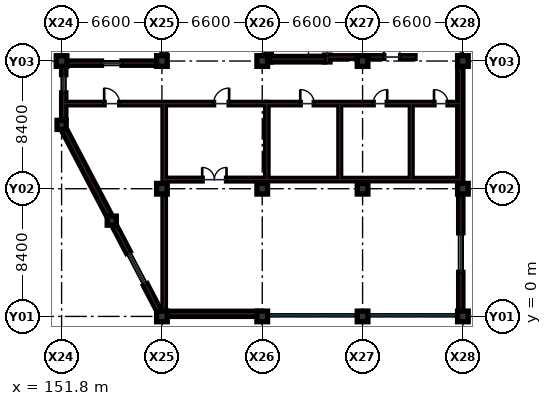
"""IFC4 building model, lengths in metres.
Left out: names, types, materials, properties, quantities, classifications, styles, units other than length and angle.
Written with IfcOpenShell. Run it as: python <this file> out.ifc"""

import sys

from ifc_helpers import new_model, si_unit, direction, frame, frame_2d, origin, origin_2d, place, context, subcontext, project, spatial, rectangle, extrude, element, fill, save


model = new_model("IFC4")
c1 = context("Model", 3, precision=1e-05, world=origin(), true_north=direction((0.0, 1.0)))
c2 = subcontext(c1, "Body", "Model", "MODEL_VIEW")
j1 = project(units=[si_unit("LENGTHUNIT", "METRE"), si_unit("PLANEANGLEUNIT", "RADIAN")], contexts=[c1])
p1 = place(None, origin())
s1 = spatial("IfcSite", under=j1, at=p1, CompositionType="ELEMENT")
p2 = place(p1, origin())
s2 = spatial("IfcBuilding", under=s1, at=p2, CompositionType="ELEMENT")
p3 = place(p2, frame((0.0, 0.0, 22.8)))
s3 = spatial("IfcBuildingStorey", under=s2, at=p3, CompositionType="ELEMENT", Elevation=22.8)
for number, where, z_axis, x_axis in (
    (1, (151.8, 16.8, 0.0), (0.0, 0.0, 1.0), (1.0, 0.0, 0.0)),
    (2, (158.4, 0.0, 0.0), (0.0, 0.0, 1.0), (1.0, 0.0, 0.0)),
    (3, (158.4, 8.4, 0.0), (0.0, 0.0, 1.0), (1.0, 0.0, 0.0)),
    (4, (158.4, 16.8, 0.0), (0.0, 0.0, 1.0), (1.0, 0.0, 0.0)),
    (5, (165.0, 0.0, 0.0), (0.0, 0.0, 1.0), (1.0, 0.0, 0.0)),
    (6, (165.0, 8.4, 0.0), (0.0, 0.0, 1.0), (1.0, 0.0, 0.0)),
    (7, (165.0, 16.8, 0.0), (0.0, 0.0, 1.0), (1.0, 0.0, 0.0)),
    (8, (171.6, 0.0, 0.0), (0.0, 0.0, 1.0), (1.0, 0.0, 0.0)),
    (9, (171.6, 8.4, 0.0), (0.0, 0.0, 1.0), (1.0, 0.0, 0.0)),
    (10, (171.6, 16.8, 0.0), (0.0, 0.0, 1.0), (1.0, 0.0, 0.0)),
    (11, (178.2, 0.0, 0.0), (0.0, 0.0, 1.0), (1.0, 0.0, 0.0)),
    (12, (178.2, 8.4, 0.0), (0.0, 0.0, 1.0), (1.0, 0.0, 0.0)),
    (13, (178.2, 16.8, 0.0), (0.0, 0.0, 1.0), (1.0, 0.0, 0.0)),
):
    element("IfcColumn", number, at=place(p3, frame(where, z_axis=z_axis, x_axis=x_axis)), inside=s3, PredefinedType="COLUMN", context=c2, shape_type="SweptSolid", body=[
        extrude(rectangle(XDim=0.7, YDim=0.7, at=origin_2d()), origin(), (0.0, 0.0, 1.0), 4.2),
    ])
for number, where, z_axis, x_axis in (
    (14, (151.8, 12.6, 0.0), (0.0, 0.0, 1.0), (1.0, 0.0, 0.0)),
    (15, (155.1, 6.3, 0.0), (0.0, 0.0, 1.0), (1.0, 0.0, 0.0)),
):
    element("IfcColumn", number, at=place(p3, frame(where, z_axis=z_axis, x_axis=x_axis)), inside=s3, PredefinedType="COLUMN", context=c2, shape_type="SweptSolid", body=[
        extrude(rectangle(XDim=0.6, YDim=0.6, at=origin_2d()), origin(), (0.0, 0.0, 1.0), 4.2),
    ])
p4 = place(p3, frame((165.3, 14.0, 0.0), z_axis=(0.0, 0.0, 1.0), x_axis=(1.0, 0.0, 0.0)))
e16 = element("IfcWall", 16, at=p4, inside=s3, PredefinedType="PARTITIONING", context=c2, shape_type="SweptSolid", body=[
    extrude(rectangle(XDim=12.7, YDim=0.16, at=frame_2d((6.35, 0.0))), origin(), (0.0, 0.0, 1.0), 3.23),
])
p5 = place(p4, frame((2.2, 0.0, 0.0)))
e17 = element("IfcOpeningElement", 17, at=p5, cuts=e16, PredefinedType="OPENING", context=c2, shape_type="SweptSolid", body=[
    extrude(rectangle(XDim=0.92, YDim=2.08, at=frame_2d((0.46, 1.04))), frame((0.0, 0.09, 0.0), z_axis=(0.0, -1.0, 0.0), x_axis=(1.0, 0.0, 0.0)), (0.0, 0.0, 1.0), 0.18),
])
p6 = place(p4, frame((7.0, 0.0, 0.0)))
e18 = element("IfcOpeningElement", 18, at=p6, cuts=e16, PredefinedType="OPENING", context=c2, shape_type="SweptSolid", body=[
    extrude(rectangle(XDim=0.92, YDim=2.08, at=frame_2d((0.46, 1.04))), frame((0.0, 0.09, 0.0), z_axis=(0.0, -1.0, 0.0), x_axis=(1.0, 0.0, 0.0)), (0.0, 0.0, 1.0), 0.18),
])
p7 = place(p4, frame((11.0, 0.0, 0.0)))
e19 = element("IfcOpeningElement", 19, at=p7, cuts=e16, PredefinedType="OPENING", context=c2, shape_type="SweptSolid", body=[
    extrude(rectangle(XDim=0.92, YDim=2.08, at=frame_2d((0.46, 1.04))), frame((0.0, 0.09, 0.0), z_axis=(0.0, -1.0, 0.0), x_axis=(1.0, 0.0, 0.0)), (0.0, 0.0, 1.0), 0.18),
])
p8 = place(p3, frame((165.3, 9.0, 0.0), z_axis=(0.0, 0.0, 1.0), x_axis=(1.0, 0.0, 0.0)))
e20 = element("IfcWall", 20, at=p8, inside=s3, PredefinedType="PARTITIONING", context=c2, shape_type="SweptSolid", body=[
    extrude(rectangle(XDim=12.7, YDim=0.16, at=frame_2d((6.35, 0.0))), origin(), (0.0, 0.0, 1.0), 3.23),
])
p9 = place(p3, frame((165.3, 9.0, 0.0), z_axis=(0.0, 0.0, 1.0), x_axis=(0.0, 1.0, 0.0)))
e21 = element("IfcWall", 21, at=p9, inside=s3, PredefinedType="PARTITIONING", context=c2, shape_type="SweptSolid", body=[
    extrude(rectangle(XDim=5.0, YDim=0.16, at=frame_2d((2.5, 0.0))), origin(), (0.0, 0.0, 1.0), 3.23),
])
for number, where, z_axis, x_axis in (
    (22, (170.1, 9.0, 0.0), (0.0, 0.0, 1.0), (0.0, 1.0, 0.0)),
    (23, (174.8, 9.0, 0.0), (0.0, 0.0, 1.0), (0.0, 1.0, 0.0)),
):
    element("IfcWall", number, at=place(p3, frame(where, z_axis=z_axis, x_axis=x_axis)), inside=s3, PredefinedType="PARTITIONING", context=c2, shape_type="SweptSolid", body=[
        extrude(rectangle(XDim=5.0, YDim=0.12, at=frame_2d((2.5, 0.0))), origin(), (0.0, 0.0, 1.0), 3.23),
    ])
p10 = place(p3, frame((158.55, 9.0, 0.0), z_axis=(0.0, 0.0, 1.0), x_axis=(1.0, 0.0, 0.0)))
e24 = element("IfcWall", 24, at=p10, inside=s3, PredefinedType="SOLIDWALL", context=c2, shape_type="SweptSolid", body=[
    extrude(rectangle(XDim=6.75, YDim=0.18, at=frame_2d((3.375, 0.0))), origin(), (0.0, 0.0, 1.0), 3.23),
])
p11 = place(p10, frame((2.5, 0.0, 0.0)))
e25 = element("IfcOpeningElement", 25, at=p11, cuts=e24, PredefinedType="OPENING", context=c2, shape_type="SweptSolid", body=[
    extrude(rectangle(XDim=1.6, YDim=2.2, at=frame_2d((0.8, 1.1))), frame((0.0, 0.1, 0.0), z_axis=(0.0, -1.0, 0.0), x_axis=(1.0, 0.0, 0.0)), (0.0, 0.0, 1.0), 0.2),
])
p12 = place(p3, frame((158.55, 0.25, 0.0), z_axis=(0.0, 0.0, 1.0), x_axis=(0.0, 1.0, 0.0)))
e26 = element("IfcWall", 26, at=p12, inside=s3, PredefinedType="PARTITIONING", context=c2, shape_type="SweptSolid", body=[
    extrude(rectangle(XDim=7.7, YDim=0.16, at=frame_2d((3.85, 0.0))), origin(), (0.0, 0.0, 1.0), 3.23),
])
p13 = place(p3, frame((158.55, 8.85, 0.0), z_axis=(0.0, 0.0, 1.0), x_axis=(0.0, 1.0, 0.0)))
e27 = element("IfcWall", 27, at=p13, inside=s3, PredefinedType="PARTITIONING", context=c2, shape_type="SweptSolid", body=[
    extrude(rectangle(XDim=5.15, YDim=0.16, at=frame_2d((2.575, 0.0))), origin(), (0.0, 0.0, 1.0), 3.23),
])
p14 = place(p3, frame((152.0, 14.0, 0.0), z_axis=(0.0, 0.0, 1.0), x_axis=(1.0, 0.0, 0.0)))
e28 = element("IfcWall", 28, at=p14, inside=s3, PredefinedType="PARTITIONING", context=c2, shape_type="SweptSolid", body=[
    extrude(rectangle(XDim=13.3, YDim=0.16, at=frame_2d((6.65, 0.0))), origin(), (0.0, 0.0, 1.0), 3.23),
])
p15 = place(p14, frame((2.6, 0.0, 0.0)))
e29 = element("IfcOpeningElement", 29, at=p15, cuts=e28, PredefinedType="OPENING", context=c2, shape_type="SweptSolid", body=[
    extrude(rectangle(XDim=1.02, YDim=2.18, at=frame_2d((0.51, 1.09))), frame((0.0, 0.09, 0.0), z_axis=(0.0, -1.0, 0.0), x_axis=(1.0, 0.0, 0.0)), (0.0, 0.0, 1.0), 0.18),
])
p16 = place(p14, frame((9.8, 0.0, 0.0)))
e30 = element("IfcOpeningElement", 30, at=p16, cuts=e28, PredefinedType="OPENING", context=c2, shape_type="SweptSolid", body=[
    extrude(rectangle(XDim=1.02, YDim=2.18, at=frame_2d((0.51, 1.09))), frame((0.0, 0.09, 0.0), z_axis=(0.0, -1.0, 0.0), x_axis=(1.0, 0.0, 0.0)), (0.0, 0.0, 1.0), 0.18),
])
p17 = place(p3, frame((158.055, 16.66, 0.0), z_axis=(0.0, 0.0, 1.0), x_axis=(-1.0, 0.0, 0.0)))
e31 = element("IfcWall", 31, at=p17, inside=s3, PredefinedType="SOLIDWALL", context=c2, shape_type="SweptSolid", body=[
    extrude(rectangle(XDim=5.91, YDim=0.28, at=frame_2d((2.955, 0.0))), origin(), (0.0, 0.0, 1.0), 3.365),
])
p18 = place(p17, frame((2.28, 0.0, 0.95)))
e32 = element("IfcOpeningElement", 32, at=p18, cuts=e31, PredefinedType="OPENING", context=c2, shape_type="SweptSolid", body=[
    extrude(rectangle(XDim=1.35, YDim=1.55, at=frame_2d((0.675, 0.775))), frame((0.0, 0.15, 0.0), z_axis=(0.0, -1.0, 0.0), x_axis=(1.0, 0.0, 0.0)), (0.0, 0.0, 1.0), 0.3),
])
p19 = place(p3, frame((158.745, 0.17, 0.0), z_axis=(0.0, 0.0, 1.0), x_axis=(1.0, 0.0, 0.0)))
e33 = element("IfcWall", 33, at=p19, inside=s3, PredefinedType="SHEAR", context=c2, shape_type="SweptSolid", body=[
    extrude(rectangle(XDim=5.91, YDim=0.34, at=frame_2d((2.955, 0.0))), origin(), (0.0, 0.0, 1.0), 3.98),
])
p20 = place(p3, frame((158.54, 24.855, 0.0), z_axis=(0.0, 0.0, 1.0), x_axis=(0.0, -1.0, 0.0)))
e34 = element("IfcWall", 34, at=p20, inside=s3, PredefinedType="SOLIDWALL", context=c2, shape_type="SweptSolid", body=[
    extrude(rectangle(XDim=7.71, YDim=0.28, at=frame_2d((3.855, 0.0))), origin(), (0.0, 0.0, 1.0), 3.265),
])
p21 = place(p20, frame((2.305, 0.0, 0.95)))
e35 = element("IfcOpeningElement", 35, at=p21, cuts=e34, PredefinedType="OPENING", context=c2, shape_type="SweptSolid", body=[
    extrude(rectangle(XDim=3.1, YDim=2.05, at=frame_2d((1.55, 1.025))), frame((0.0, 0.15, 0.0), z_axis=(0.0, -1.0, 0.0), x_axis=(1.0, 0.0, 0.0)), (0.0, 0.0, 1.0), 0.3),
])
p22 = place(p3, frame((178.06, 0.345, 0.0), z_axis=(0.0, 0.0, 1.0), x_axis=(0.0, 1.0, 0.0)))
e36 = element("IfcWall", 36, at=p22, inside=s3, PredefinedType="SOLIDWALL", context=c2, shape_type="SweptSolid", body=[
    extrude(rectangle(XDim=7.71, YDim=0.28, at=frame_2d((3.855, 0.0))), origin(), (0.0, 0.0, 1.0), 3.265),
])
p23 = place(p22, frame((2.555, 0.0, 0.95)))
e37 = element("IfcOpeningElement", 37, at=p23, cuts=e36, PredefinedType="OPENING", context=c2, shape_type="SweptSolid", body=[
    extrude(rectangle(XDim=2.6, YDim=1.9, at=frame_2d((1.3, 0.95))), frame((0.0, 0.15, 0.0), z_axis=(0.0, -1.0, 0.0), x_axis=(1.0, 0.0, 0.0)), (0.0, 0.0, 1.0), 0.3),
])
p24 = place(p3, frame((178.03, 8.745, 0.0), z_axis=(0.0, 0.0, 1.0), x_axis=(0.0, 1.0, 0.0)))
e38 = element("IfcWall", 38, at=p24, inside=s3, PredefinedType="SHEAR", context=c2, shape_type="SweptSolid", body=[
    extrude(rectangle(XDim=7.71, YDim=0.34, at=frame_2d((3.855, 0.0))), origin(), (0.0, 0.0, 1.0), 3.98),
])
p25 = place(p3, frame((151.94, 16.455, 0.0), z_axis=(0.0, 0.0, 1.0), x_axis=(0.0, -1.0, 0.0)))
e39 = element("IfcWall", 39, at=p25, inside=s3, PredefinedType="SOLIDWALL", context=c2, shape_type="SweptSolid", body=[
    extrude(rectangle(XDim=3.56, YDim=0.28, at=frame_2d((1.78, 0.0))), origin(), (0.0, 0.0, 1.0), 3.365),
])
p26 = place(p25, frame((0.55, 0.0, 0.95)))
e40 = element("IfcOpeningElement", 40, at=p26, cuts=e39, PredefinedType="OPENING", context=c2, shape_type="SweptSolid", body=[
    extrude(rectangle(XDim=1.2, YDim=1.5, at=frame_2d((0.6, 0.75))), frame((0.0, 0.15, 0.0), z_axis=(0.0, -1.0, 0.0), x_axis=(1.0, 0.0, 0.0)), (0.0, 0.0, 1.0), 0.3),
])
p27 = place(p3, frame((151.95, 12.31, 0.0), z_axis=(0.0, 0.0, 1.0), x_axis=(0.464471613901, -0.885588007981, 0.0)))
e41 = element("IfcWall", 41, at=p27, inside=s3, PredefinedType="SHEAR", context=c2, shape_type="SweptSolid", body=[
    extrude(rectangle(XDim=6.459, YDim=0.34, at=frame_2d((3.229, 0.0))), origin(), (0.0, 0.0, 1.0), 3.98),
])
p28 = place(p3, frame((155.25, 6.01, 0.0), z_axis=(0.0, 0.0, 1.0), x_axis=(0.464471613901, -0.885588007981, 0.0)))
e42 = element("IfcWall", 42, at=p28, inside=s3, PredefinedType="SOLIDWALL", context=c2, shape_type="SweptSolid", body=[
    extrude(rectangle(XDim=6.459, YDim=0.28, at=frame_2d((3.229, 0.0))), origin(), (0.0, 0.0, 1.0), 3.365),
])
p29 = place(p28, frame((2.03, 0.0, 0.95)))
e43 = element("IfcOpeningElement", 43, at=p29, cuts=e42, PredefinedType="OPENING", context=c2, shape_type="SweptSolid", body=[
    extrude(rectangle(XDim=2.4, YDim=1.6, at=frame_2d((1.2, 0.8))), frame((0.0, 0.15, 0.0), z_axis=(0.0, -1.0, 0.0), x_axis=(1.0, 0.0, 0.0)), (0.0, 0.0, 1.0), 0.3),
])
p30 = place(p3, frame((165.42, 16.74, 0.0), z_axis=(0.0, 0.0, 1.0), x_axis=(0.0, 1.0, 0.0)))
e44 = element("IfcWall", 44, at=p30, inside=s3, PredefinedType="SHEAR", context=c2, shape_type="SweptSolid", body=[
    extrude(rectangle(XDim=8.37, YDim=0.36, at=frame_2d((4.185, 0.0))), origin(), (0.0, 0.0, 1.0), 3.98),
])
p31 = place(p3, frame((169.28, 16.74, 0.0), z_axis=(0.0, 0.0, 1.0), x_axis=(0.0, 1.0, 0.0)))
e45 = element("IfcWall", 45, at=p31, inside=s3, PredefinedType="SHEAR", context=c2, shape_type="SweptSolid", body=[
    extrude(rectangle(XDim=8.37, YDim=0.36, at=frame_2d((4.185, 0.0))), origin(), (0.0, 0.0, 1.0), 3.98),
])
p32 = place(p31, frame((0.45, 0.0, 0.0)))
e46 = element("IfcOpeningElement", 46, at=p32, cuts=e45, PredefinedType="OPENING", context=c2, shape_type="SweptSolid", body=[
    extrude(rectangle(XDim=1.25, YDim=2.15, at=frame_2d((0.625, 1.075))), frame((0.0, 0.19, 0.0), z_axis=(0.0, -1.0, 0.0), x_axis=(1.0, 0.0, 0.0)), (0.0, 0.0, 1.0), 0.38),
])
p33 = place(p3, frame((165.6, 16.92, 0.0), z_axis=(0.0, 0.0, 1.0), x_axis=(1.0, 0.0, 0.0)))
e47 = element("IfcWall", 47, at=p33, inside=s3, PredefinedType="SHEAR", context=c2, shape_type="SweptSolid", body=[
    extrude(rectangle(XDim=3.5, YDim=0.36, at=frame_2d((1.75, 0.0))), origin(), (0.0, 0.0, 1.0), 3.98),
])
p34 = place(p3, frame((169.35, 17.06, 0.0), z_axis=(0.0, 0.0, 1.0), x_axis=(1.0, 0.0, 0.0)))
e48 = element("IfcWall", 48, at=p34, inside=s3, PredefinedType="SOLIDWALL", context=c2, shape_type="SweptSolid", body=[
    extrude(rectangle(XDim=5.7, YDim=0.18, at=frame_2d((2.85, 0.0))), origin(), (0.0, 0.0, 1.0), 3.315),
])
p35 = place(p34, frame((3.65, 0.0, 0.0)))
e49 = element("IfcOpeningElement", 49, at=p35, cuts=e48, PredefinedType="OPENING", context=c2, shape_type="SweptSolid", body=[
    extrude(rectangle(XDim=1.1, YDim=2.15, at=frame_2d((0.55, 1.075))), frame((0.0, 0.1, 0.0), z_axis=(0.0, -1.0, 0.0), x_axis=(1.0, 0.0, 0.0)), (0.0, 0.0, 1.0), 0.2),
])
p36 = place(p5, origin())
e50 = element("IfcDoor", 50, at=p36, inside=s3, OperationType="SINGLE_SWING_LEFT", PredefinedType="DOOR", context=c2, shape_type="SweptSolid", body=[
    extrude(rectangle(XDim=0.92, YDim=2.08, at=frame_2d((0.46, 1.04))), frame((0.0, 0.025, 0.0), z_axis=(0.0, -1.0, 0.0), x_axis=(1.0, 0.0, 0.0)), (0.0, 0.0, 1.0), 0.05),
])
fill(e17, e50)
p37 = place(p6, origin())
e51 = element("IfcDoor", 51, at=p37, inside=s3, OperationType="SINGLE_SWING_RIGHT", PredefinedType="DOOR", context=c2, shape_type="SweptSolid", body=[
    extrude(rectangle(XDim=0.92, YDim=2.08, at=frame_2d((0.46, 1.04))), frame((0.0, 0.025, 0.0), z_axis=(0.0, -1.0, 0.0), x_axis=(1.0, 0.0, 0.0)), (0.0, 0.0, 1.0), 0.05),
])
fill(e18, e51)
p38 = place(p7, origin())
e52 = element("IfcDoor", 52, at=p38, inside=s3, OperationType="SINGLE_SWING_LEFT", PredefinedType="DOOR", context=c2, shape_type="SweptSolid", body=[
    extrude(rectangle(XDim=0.92, YDim=2.08, at=frame_2d((0.46, 1.04))), frame((0.0, 0.025, 0.0), z_axis=(0.0, -1.0, 0.0), x_axis=(1.0, 0.0, 0.0)), (0.0, 0.0, 1.0), 0.05),
])
fill(e19, e52)
p39 = place(p11, origin())
e53 = element("IfcDoor", 53, at=p39, inside=s3, OperationType="DOUBLE_DOOR_SINGLE_SWING", PredefinedType="DOOR", context=c2, shape_type="SweptSolid", body=[
    extrude(rectangle(XDim=1.6, YDim=2.2, at=frame_2d((0.8, 1.1))), frame((0.0, 0.025, 0.0), z_axis=(0.0, -1.0, 0.0), x_axis=(1.0, 0.0, 0.0)), (0.0, 0.0, 1.0), 0.05),
])
fill(e25, e53)
p40 = place(p15, origin())
e54 = element("IfcDoor", 54, at=p40, inside=s3, OperationType="SINGLE_SWING_LEFT", PredefinedType="DOOR", context=c2, shape_type="SweptSolid", body=[
    extrude(rectangle(XDim=1.02, YDim=2.18, at=frame_2d((0.51, 1.09))), frame((0.0, 0.025, 0.0), z_axis=(0.0, -1.0, 0.0), x_axis=(1.0, 0.0, 0.0)), (0.0, 0.0, 1.0), 0.05),
])
fill(e29, e54)
p41 = place(p16, origin())
e55 = element("IfcDoor", 55, at=p41, inside=s3, OperationType="SINGLE_SWING_RIGHT", PredefinedType="DOOR", context=c2, shape_type="SweptSolid", body=[
    extrude(rectangle(XDim=1.02, YDim=2.18, at=frame_2d((0.51, 1.09))), frame((0.0, 0.025, 0.0), z_axis=(0.0, -1.0, 0.0), x_axis=(1.0, 0.0, 0.0)), (0.0, 0.0, 1.0), 0.05),
])
fill(e30, e55)
p42 = place(p18, origin())
e56 = element("IfcWindow", 56, at=p42, inside=s3, PartitioningType="SINGLE_PANEL", PredefinedType="WINDOW", context=c2, shape_type="SweptSolid", body=[
    extrude(rectangle(XDim=1.35, YDim=1.55, at=frame_2d((0.675, 0.775))), frame((0.0, 0.03, 0.0), z_axis=(0.0, -1.0, 0.0), x_axis=(1.0, 0.0, 0.0)), (0.0, 0.0, 1.0), 0.06),
])
fill(e32, e56)
p43 = place(p23, origin())
e57 = element("IfcWindow", 57, at=p43, inside=s3, PartitioningType="SINGLE_PANEL", PredefinedType="WINDOW", context=c2, shape_type="SweptSolid", body=[
    extrude(rectangle(XDim=2.6, YDim=1.9, at=frame_2d((1.3, 0.95))), frame((0.0, 0.03, 0.0), z_axis=(0.0, -1.0, 0.0), x_axis=(1.0, 0.0, 0.0)), (0.0, 0.0, 1.0), 0.06),
])
fill(e37, e57)
p44 = place(p26, origin())
e58 = element("IfcWindow", 58, at=p44, inside=s3, PartitioningType="SINGLE_PANEL", PredefinedType="WINDOW", context=c2, shape_type="SweptSolid", body=[
    extrude(rectangle(XDim=1.2, YDim=1.5, at=frame_2d((0.6, 0.75))), frame((0.0, 0.03, 0.0), z_axis=(0.0, -1.0, 0.0), x_axis=(1.0, 0.0, 0.0)), (0.0, 0.0, 1.0), 0.06),
])
fill(e40, e58)
p45 = place(p29, origin())
e59 = element("IfcWindow", 59, at=p45, inside=s3, PartitioningType="SINGLE_PANEL", PredefinedType="WINDOW", context=c2, shape_type="SweptSolid", body=[
    extrude(rectangle(XDim=2.4, YDim=1.6, at=frame_2d((1.2, 0.8))), frame((0.0, 0.03, 0.0), z_axis=(0.0, -1.0, 0.0), x_axis=(1.0, 0.0, 0.0)), (0.0, 0.0, 1.0), 0.06),
])
fill(e43, e59)
p46 = place(p32, origin())
e60 = element("IfcDoor", 60, at=p46, inside=s3, OperationType="SINGLE_SWING_LEFT", PredefinedType="DOOR", context=c2, shape_type="SweptSolid", body=[
    extrude(rectangle(XDim=1.25, YDim=2.15, at=frame_2d((0.625, 1.075))), frame((0.0, 0.025, 0.0), z_axis=(0.0, -1.0, 0.0), x_axis=(1.0, 0.0, 0.0)), (0.0, 0.0, 1.0), 0.05),
])
fill(e46, e60)
p47 = place(p35, origin())
e61 = element("IfcDoor", 61, at=p47, inside=s3, OperationType="SINGLE_SWING_LEFT", PredefinedType="DOOR", context=c2, shape_type="SweptSolid", body=[
    extrude(rectangle(XDim=1.1, YDim=2.15, at=frame_2d((0.55, 1.075))), frame((0.0, 0.025, 0.0), z_axis=(0.0, -1.0, 0.0), x_axis=(1.0, 0.0, 0.0)), (0.0, 0.0, 1.0), 0.05),
])
fill(e49, e61)
save(model, sys.argv[1])
